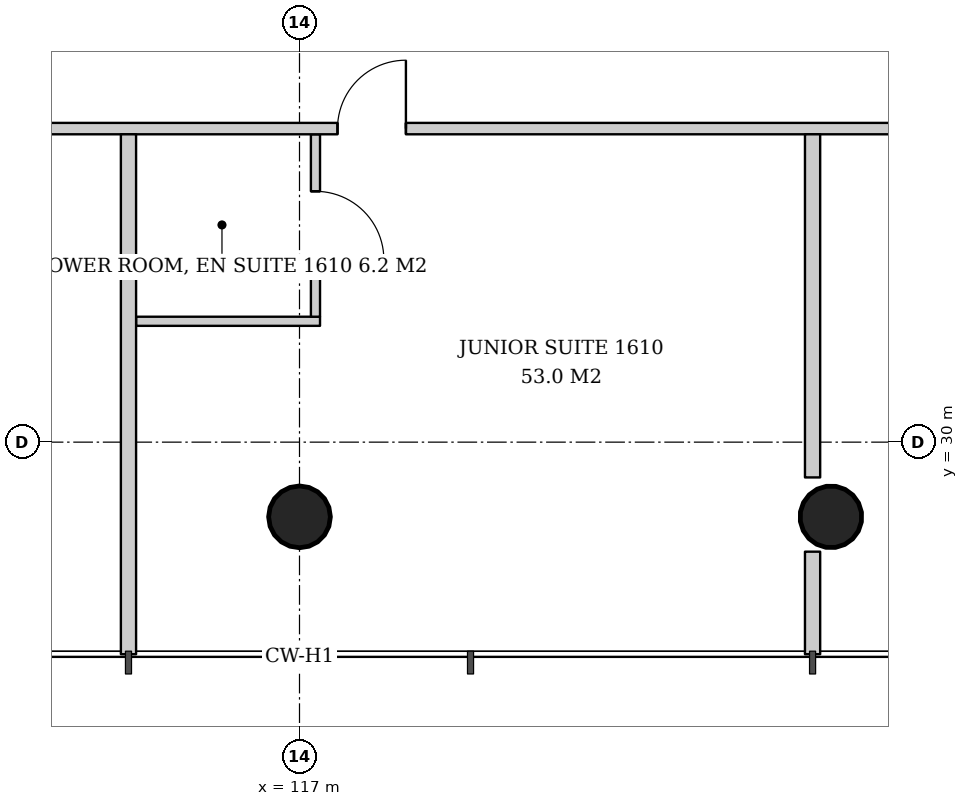
"""IFC4 building model, lengths in metres.
Left out: names, types, materials, properties, quantities, classifications, styles, units other than length and angle.
Written with IfcOpenShell. Run it as: python <this file> out.ifc"""

import sys

from ifc_helpers import new_model, si_unit, direction, frame, frame_2d, origin, origin_2d, place, context, subcontext, project, spatial, rectangle, hollow_circle, extrude, element, fill, save


model = new_model("IFC4")
c1 = context("Model", 3, precision=1e-05, world=origin(), true_north=direction((0.0, 1.0)))
c2 = subcontext(c1, "Body", "Model", "MODEL_VIEW")
j1 = project(units=[si_unit("LENGTHUNIT", "METRE"), si_unit("PLANEANGLEUNIT", "RADIAN")], contexts=[c1])
p1 = place(None, origin())
s1 = spatial("IfcSite", under=j1, at=p1, CompositionType="ELEMENT")
p2 = place(p1, origin())
s2 = spatial("IfcBuilding", under=s1, at=p2, CompositionType="ELEMENT")
p3 = place(p2, frame((0.0, 0.0, 66.6)))
s3 = spatial("IfcBuildingStorey", under=s2, at=p3, CompositionType="ELEMENT", Elevation=66.6)
p4 = place(p3, frame((117.0, 28.966, 0.0), z_axis=(0.0, 0.043072300418, 0.999071957837), x_axis=(-1.0, 0.0, 0.0)))
e1 = element("IfcColumn", 1, at=p4, inside=s3, PredefinedType="COLUMN", context=c2, shape_type="SweptSolid", body=[
    extrude(hollow_circle(Radius=0.406, WallThickness=0.03, at=origin_2d()), origin(), (0.0, 0.0, 1.0), 3.803),
])
p5 = place(p3, frame((124.017, 28.966, 0.0), z_axis=(-0.021563230905, 0.043062285527, 0.998839660125), x_axis=(-0.894160516368, -0.44774654769, 0.0)))
e2 = element("IfcColumn", 2, at=p5, inside=s3, PredefinedType="COLUMN", context=c2, shape_type="SweptSolid", body=[
    extrude(hollow_circle(Radius=0.406, WallThickness=0.03, at=origin_2d()), origin(), (0.0, 0.0, 1.0), 3.804),
])
p6 = place(p3, frame((114.85, 31.59, 0.0), z_axis=(0.0, 0.0, 1.0), x_axis=(1.0, 0.0, 0.0)))
e3 = element("IfcWall", 3, at=p6, inside=s3, PredefinedType="PARTITIONING", context=c2, shape_type="SweptSolid", body=[
    extrude(rectangle(XDim=2.42, YDim=0.12, at=frame_2d((1.21, 0.0))), origin(), (0.0, 0.0, 1.0), 2.847),
])
p7 = place(p3, frame((117.21, 34.05, 0.0), z_axis=(0.0, 0.0, 1.0), x_axis=(0.0, -1.0, 0.0)))
e4 = element("IfcWall", 4, at=p7, inside=s3, PredefinedType="PARTITIONING", context=c2, shape_type="SweptSolid", body=[
    extrude(rectangle(XDim=2.4, YDim=0.12, at=frame_2d((1.2, 0.0))), origin(), (0.0, 0.0, 1.0), 3.6),
])
p8 = place(p7, frame((0.75, 0.0, 0.0)))
e5 = element("IfcOpeningElement", 5, at=p8, cuts=e4, PredefinedType="OPENING", context=c2, shape_type="SweptSolid", body=[
    extrude(rectangle(XDim=0.9, YDim=2.1, at=frame_2d((0.45, 1.05))), frame((0.0, 0.07, 0.0), z_axis=(0.0, -1.0, 0.0), x_axis=(1.0, 0.0, 0.0)), (0.0, 0.0, 1.0), 0.14),
])
p9 = place(p3, frame((105.05, 34.125, 0.0), z_axis=(0.0, 0.0, 1.0), x_axis=(1.0, 0.0, 0.0)))
e6 = element("IfcWall", 6, at=p9, inside=s3, PredefinedType="PARTITIONING", context=c2, shape_type="SweptSolid", body=[
    extrude(rectangle(XDim=23.75, YDim=0.15, at=frame_2d((11.875, 0.0))), origin(), (0.0, 0.0, 1.0), 2.8),
])
p10 = place(p9, frame((2.175, 0.0, 0.0)))
e7 = element("IfcOpeningElement", 7, at=p10, cuts=e6, PredefinedType="OPENING", context=c2, shape_type="SweptSolid", body=[
    extrude(rectangle(XDim=0.9, YDim=2.1, at=frame_2d((0.45, 1.05))), frame((0.0, 0.085, 0.0), z_axis=(0.0, -1.0, 0.0), x_axis=(1.0, 0.0, 0.0)), (0.0, 0.0, 1.0), 0.17),
])
p11 = place(p9, frame((12.45, 0.0, 0.0)))
e8 = element("IfcOpeningElement", 8, at=p11, cuts=e6, PredefinedType="OPENING", context=c2, shape_type="SweptSolid", body=[
    extrude(rectangle(XDim=0.9, YDim=2.1, at=frame_2d((0.45, 1.05))), frame((0.0, 0.085, 0.0), z_axis=(0.0, -1.0, 0.0), x_axis=(1.0, 0.0, 0.0)), (0.0, 0.0, 1.0), 0.17),
])
p12 = place(p3, frame((114.75, 34.05, 0.0), z_axis=(0.0, 0.0, 1.0), x_axis=(0.0, -1.0, 0.0)))
e9 = element("IfcWall", 9, at=p12, inside=s3, PredefinedType="PARTITIONING", context=c2, shape_type="SweptSolid", body=[
    extrude(rectangle(XDim=6.84, YDim=0.2, at=frame_2d((3.42, 0.0))), origin(), (0.0, 0.0, 1.0), 3.05),
])
p13 = place(p3, frame((123.75, 34.05, 0.0), z_axis=(0.0, 0.0, 1.0), x_axis=(0.0, -1.0, 0.0)))
e10 = element("IfcWall", 10, at=p13, inside=s3, PredefinedType="PARTITIONING", context=c2, shape_type="SweptSolid", body=[
    extrude(rectangle(XDim=4.514, YDim=0.2, at=frame_2d((2.257, 0.0))), origin(), (0.0, 0.0, 1.0), 3.6),
])
p14 = place(p3, frame((123.75, 28.559, 0.0), z_axis=(0.0, 0.0, 1.0), x_axis=(0.0, -1.0, 0.0)))
e11 = element("IfcWall", 11, at=p14, inside=s3, PredefinedType="PARTITIONING", context=c2, shape_type="SweptSolid", body=[
    extrude(rectangle(XDim=1.349, YDim=0.2, at=frame_2d((0.675, 0.0))), origin(), (0.0, 0.0, 1.0), 3.6),
])
p15 = place(p8, origin())
e12 = element("IfcDoor", 12, at=p15, inside=s3, OperationType="SINGLE_SWING_RIGHT", PredefinedType="DOOR", context=c2, shape_type="SweptSolid", body=[
    extrude(rectangle(XDim=0.9, YDim=2.1, at=frame_2d((0.45, 1.05))), frame((0.0, 0.025, 0.0), z_axis=(0.0, -1.0, 0.0), x_axis=(1.0, 0.0, 0.0)), (0.0, 0.0, 1.0), 0.05),
])
fill(e5, e12)
p16 = place(p11, origin())
e13 = element("IfcDoor", 13, at=p16, inside=s3, OperationType="SINGLE_SWING_RIGHT", PredefinedType="DOOR", context=c2, shape_type="SweptSolid", body=[
    extrude(rectangle(XDim=0.9, YDim=2.1, at=frame_2d((0.45, 1.05))), frame((0.0, 0.025, 0.0), z_axis=(0.0, -1.0, 0.0), x_axis=(1.0, 0.0, 0.0)), (0.0, 0.0, 1.0), 0.05),
])
fill(e8, e13)
save(model, sys.argv[1])
